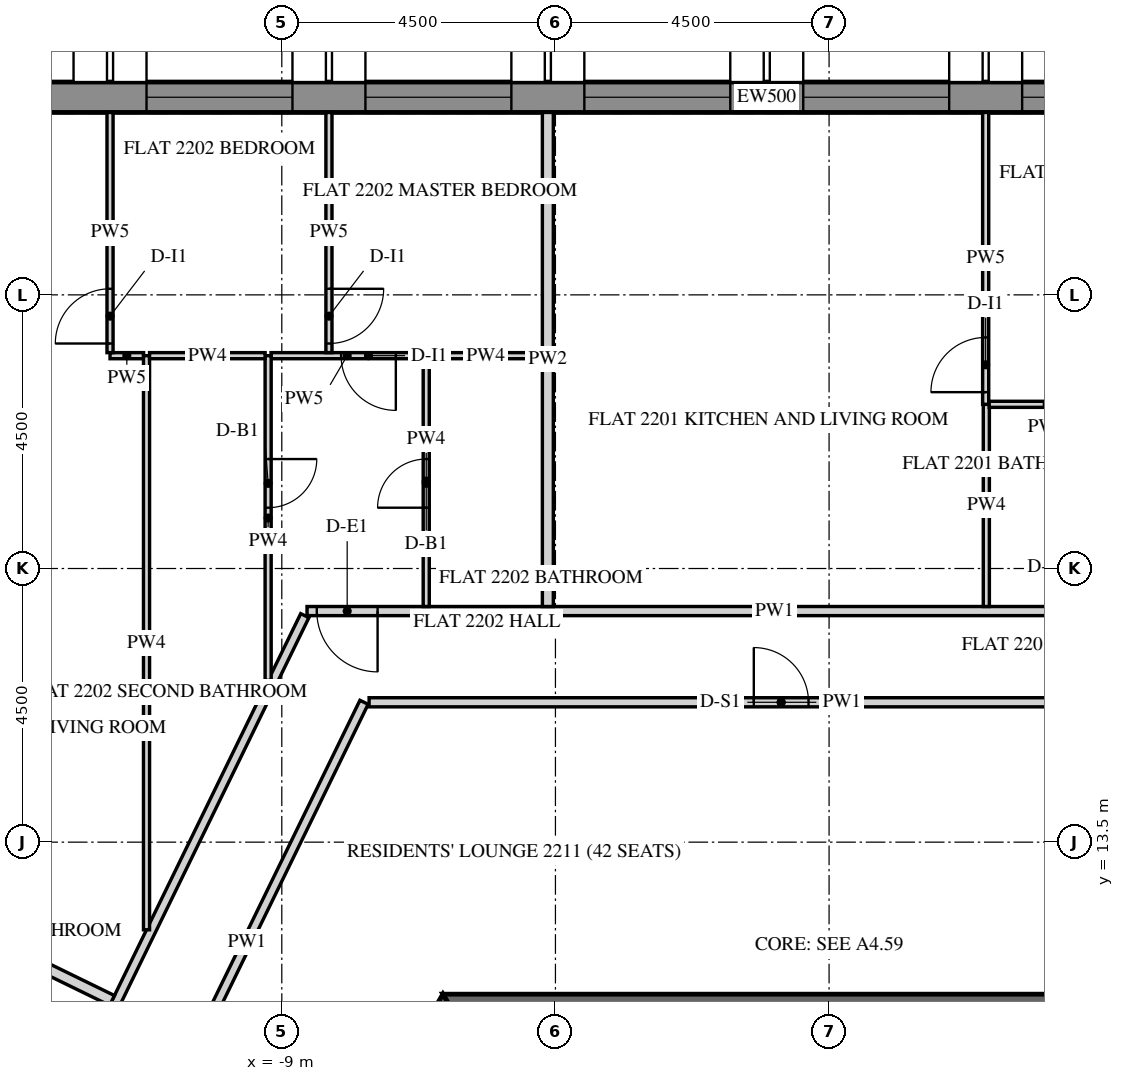
"""IFC4 building model, lengths in metres.
Left out: names, types, materials, properties, quantities, classifications, styles, units other than length and angle.
Written with IfcOpenShell. Run it as: python <this file> out.ifc"""

import sys

from ifc_helpers import new_model, si_unit, direction, frame, frame_2d, origin, place, context, subcontext, project, spatial, polyline, rectangle, outline, extrude, element, fill, save


model = new_model("IFC4")
c1 = context("Model", 3, precision=1e-05, world=origin(), true_north=direction((0.0, 1.0)))
c2 = subcontext(c1, "Body", "Model", "MODEL_VIEW")
j1 = project(units=[si_unit("LENGTHUNIT", "METRE"), si_unit("PLANEANGLEUNIT", "RADIAN")], contexts=[c1])
p1 = place(None, origin())
s1 = spatial("IfcSite", under=j1, at=p1, CompositionType="ELEMENT")
p2 = place(p1, origin())
s2 = spatial("IfcBuilding", under=s1, at=p2, CompositionType="ELEMENT")
p3 = place(p2, frame((0.0, 0.0, 279.6)))
s3 = spatial("IfcBuildingStorey", under=s2, at=p3, CompositionType="ELEMENT", Elevation=279.6)
p4 = place(p3, frame((11.698, 25.75, -0.15), z_axis=(0.0, 0.0, 1.0), x_axis=(-1.0, 0.0, 0.0)))
e1 = element("IfcWall", 1, at=p4, inside=s3, PredefinedType="SOLIDWALL", context=c2, shape_type="SweptSolid", body=[
    extrude(outline(polyline([(-0.021, -0.25), (25.468, -0.25), (25.421, 0.25), (0.021, 0.25), (-0.021, -0.25)])), origin(), (0.0, 0.0, 1.0), 3.9),
])
p5 = place(p4, frame((2.522, 0.0, 0.75)))
e2 = element("IfcOpeningElement", 2, at=p5, cuts=e1, PredefinedType="OPENING", context=c2, shape_type="SweptSolid", body=[
    extrude(rectangle(XDim=2.4, YDim=2.7, at=frame_2d((1.2, 1.35))), frame((0.0, 0.26, 0.0), z_axis=(0.0, -1.0, 0.0), x_axis=(1.0, 0.0, 0.0)), (0.0, 0.0, 1.0), 0.52),
])
p6 = place(p4, frame((6.122, 0.0, 0.75)))
e3 = element("IfcOpeningElement", 3, at=p6, cuts=e1, PredefinedType="OPENING", context=c2, shape_type="SweptSolid", body=[
    extrude(rectangle(XDim=2.4, YDim=2.7, at=frame_2d((1.2, 1.35))), frame((0.0, 0.26, 0.0), z_axis=(0.0, -1.0, 0.0), x_axis=(1.0, 0.0, 0.0)), (0.0, 0.0, 1.0), 0.52),
])
p7 = place(p4, frame((9.722, 0.0, 0.75)))
e4 = element("IfcOpeningElement", 4, at=p7, cuts=e1, PredefinedType="OPENING", context=c2, shape_type="SweptSolid", body=[
    extrude(rectangle(XDim=2.4, YDim=2.7, at=frame_2d((1.2, 1.35))), frame((0.0, 0.26, 0.0), z_axis=(0.0, -1.0, 0.0), x_axis=(1.0, 0.0, 0.0)), (0.0, 0.0, 1.0), 0.52),
])
p8 = place(p4, frame((13.323, 0.0, 0.75)))
e5 = element("IfcOpeningElement", 5, at=p8, cuts=e1, PredefinedType="OPENING", context=c2, shape_type="SweptSolid", body=[
    extrude(rectangle(XDim=2.4, YDim=2.7, at=frame_2d((1.2, 1.35))), frame((0.0, 0.26, 0.0), z_axis=(0.0, -1.0, 0.0), x_axis=(1.0, 0.0, 0.0)), (0.0, 0.0, 1.0), 0.52),
])
p9 = place(p4, frame((16.922, 0.0, 0.75)))
e6 = element("IfcOpeningElement", 6, at=p9, cuts=e1, PredefinedType="OPENING", context=c2, shape_type="SweptSolid", body=[
    extrude(rectangle(XDim=2.4, YDim=2.7, at=frame_2d((1.2, 1.35))), frame((0.0, 0.26, 0.0), z_axis=(0.0, -1.0, 0.0), x_axis=(1.0, 0.0, 0.0)), (0.0, 0.0, 1.0), 0.52),
])
p10 = place(p4, frame((20.522, 0.0, 0.75)))
e7 = element("IfcOpeningElement", 7, at=p10, cuts=e1, PredefinedType="OPENING", context=c2, shape_type="SweptSolid", body=[
    extrude(rectangle(XDim=2.4, YDim=2.7, at=frame_2d((1.2, 1.35))), frame((0.0, 0.26, 0.0), z_axis=(0.0, -1.0, 0.0), x_axis=(1.0, 0.0, 0.0)), (0.0, 0.0, 1.0), 0.52),
])
p11 = place(p3, frame((-6.235, 10.8, -0.15), z_axis=(0.0, 0.0, 1.0), x_axis=(-0.499996419489, -0.866027470984, 0.0)))
e8 = element("IfcWall", 8, at=p11, inside=s3, PredefinedType="SHEAR", context=c2, shape_type="SweptSolid", body=[
    extrude(outline(polyline([(-0.115, -0.2), (12.586, -0.2), (12.355, 0.2), (0.115, 0.2), (-0.115, -0.2)])), origin(), (0.0, 0.0, 1.0), 3.9),
])
p12 = place(p11, frame((5.364, 0.0, 0.15)))
e9 = element("IfcOpeningElement", 9, at=p12, cuts=e8, PredefinedType="OPENING", context=c2, shape_type="SweptSolid", body=[
    extrude(rectangle(XDim=1.8, YDim=2.4, at=frame_2d((0.9, 1.2))), frame((0.0, 0.21, 0.0), z_axis=(0.0, -1.0, 0.0), x_axis=(1.0, 0.0, 0.0)), (0.0, 0.0, 1.0), 0.42),
])
p13 = place(p3, frame((6.235, 10.8, -0.15), z_axis=(0.0, 0.0, 1.0), x_axis=(-1.0, 0.0, 0.0)))
e10 = element("IfcWall", 10, at=p13, inside=s3, PredefinedType="SHEAR", context=c2, shape_type="SweptSolid", body=[
    extrude(outline(polyline([(-0.115, -0.2), (12.586, -0.2), (12.355, 0.2), (0.115, 0.2), (-0.115, -0.2)])), origin(), (0.0, 0.0, 1.0), 3.9),
])
p14 = place(p3, frame((6.786, 17.3, 0.0), z_axis=(0.0, 0.0, 1.0), x_axis=(-1.0, 0.0, 0.0)))
e11 = element("IfcWall", 11, at=p14, inside=s3, PredefinedType="PARTITIONING", context=c2, shape_type="SweptSolid", body=[
    extrude(rectangle(XDim=15.371, YDim=0.15, at=frame_2d((7.686, 0.0))), origin(), (0.0, 0.0, 1.0), 2.988),
])
p15 = place(p14, frame((0.6, 0.0, 0.0)))
e12 = element("IfcOpeningElement", 12, at=p15, cuts=e11, PredefinedType="OPENING", context=c2, shape_type="SweptSolid", body=[
    extrude(rectangle(XDim=1.0, YDim=2.1, at=frame_2d((0.5, 1.05))), frame((0.0, 0.085, 0.0), z_axis=(0.0, -1.0, 0.0), x_axis=(1.0, 0.0, 0.0)), (0.0, 0.0, 1.0), 0.17),
])
p16 = place(p14, frame((14.211, 0.0, 0.0)))
e13 = element("IfcOpeningElement", 13, at=p16, cuts=e11, PredefinedType="OPENING", context=c2, shape_type="SweptSolid", body=[
    extrude(rectangle(XDim=1.0, YDim=2.1, at=frame_2d((0.5, 1.05))), frame((0.0, 0.085, 0.0), z_axis=(0.0, -1.0, 0.0), x_axis=(1.0, 0.0, 0.0)), (0.0, 0.0, 1.0), 0.17),
])
p17 = place(p3, frame((-8.622, 17.225, 0.0), z_axis=(0.0, 0.0, 1.0), x_axis=(-0.438366544921, -0.898796290765, 0.0)))
e14 = element("IfcWall", 14, at=p17, inside=s3, PredefinedType="PARTITIONING", context=c2, shape_type="SweptSolid", body=[
    extrude(rectangle(XDim=17.273, YDim=0.15, at=frame_2d((8.637, 0.0))), origin(), (0.0, 0.0, 1.0), 2.988),
])
p18 = place(p17, frame((10.078, 0.0, 0.0)))
e15 = element("IfcOpeningElement", 15, at=p18, cuts=e14, PredefinedType="OPENING", context=c2, shape_type="SweptSolid", body=[
    extrude(rectangle(XDim=1.0, YDim=2.1, at=frame_2d((0.5, 1.05))), frame((0.0, 0.085, 0.0), z_axis=(0.0, -1.0, 0.0), x_axis=(1.0, 0.0, 0.0)), (0.0, 0.0, 1.0), 0.17),
])
p19 = place(p3, frame((-11.499, 7.905, 0.0), z_axis=(0.0, 0.0, 1.0), x_axis=(0.438365041944, 0.898797023805, 0.0)))
e16 = element("IfcWall", 16, at=p19, inside=s3, PredefinedType="PARTITIONING", context=c2, shape_type="SweptSolid", body=[
    extrude(rectangle(XDim=8.784, YDim=0.15, at=frame_2d((4.392, 0.0))), origin(), (0.0, 0.0, 1.0), 2.988),
])
p20 = place(p3, frame((-7.564, 15.8, 0.0), z_axis=(0.0, 0.0, 1.0), x_axis=(1.0, 0.0, 0.0)))
e17 = element("IfcWall", 17, at=p20, inside=s3, PredefinedType="PARTITIONING", context=c2, shape_type="SweptSolid", body=[
    extrude(rectangle(XDim=13.553, YDim=0.15, at=frame_2d((6.776, 0.0))), origin(), (0.0, 0.0, 1.0), 2.988),
])
p21 = place(p20, frame((6.326, 0.0, 0.0)))
e18 = element("IfcOpeningElement", 18, at=p21, cuts=e17, PredefinedType="OPENING", context=c2, shape_type="SweptSolid", body=[
    extrude(rectangle(XDim=0.9, YDim=2.1, at=frame_2d((0.45, 1.05))), frame((0.0, 0.085, 0.0), z_axis=(0.0, -1.0, 0.0), x_axis=(1.0, 0.0, 0.0)), (0.0, 0.0, 1.0), 0.17),
])
p22 = place(p3, frame((2.586, 17.375, 0.0), z_axis=(0.0, 0.0, 1.0), x_axis=(0.0, 1.0, 0.0)))
e19 = element("IfcWall", 19, at=p22, inside=s3, PredefinedType="PARTITIONING", context=c2, shape_type="SweptSolid", body=[
    extrude(rectangle(XDim=3.325, YDim=0.1, at=frame_2d((1.663, 0.0))), origin(), (0.0, 0.0, 1.0), 2.988),
])
p23 = place(p3, frame((2.575, 20.7, 0.0), z_axis=(0.0, 0.0, 1.0), x_axis=(0.0, 1.0, 0.0)))
e20 = element("IfcWall", 20, at=p23, inside=s3, PredefinedType="PARTITIONING", context=c2, shape_type="SweptSolid", body=[
    extrude(rectangle(XDim=4.8, YDim=0.1, at=frame_2d((2.4, 0.0))), origin(), (0.0, 0.0, 1.0), 2.988),
])
p24 = place(p23, frame((0.2, 0.0, 0.0)))
e21 = element("IfcOpeningElement", 21, at=p24, cuts=e20, PredefinedType="OPENING", context=c2, shape_type="SweptSolid", body=[
    extrude(rectangle(XDim=0.9, YDim=2.1, at=frame_2d((0.45, 1.05))), frame((0.0, 0.06, 0.0), z_axis=(0.0, -1.0, 0.0), x_axis=(1.0, 0.0, 0.0)), (0.0, 0.0, 1.0), 0.12),
])
p25 = place(p3, frame((-4.625, 25.5, 0.0), z_axis=(0.0, 0.0, 1.0), x_axis=(0.0, -1.0, 0.0)))
e22 = element("IfcWall", 22, at=p25, inside=s3, PredefinedType="PARTITIONING", context=c2, shape_type="SweptSolid", body=[
    extrude(rectangle(XDim=8.125, YDim=0.18, at=frame_2d((4.062, 0.0))), origin(), (0.0, 0.0, 1.0), 2.988),
])
p26 = place(p3, frame((4.538, 20.7, 0.0), z_axis=(0.0, 0.0, 1.0), x_axis=(-1.0, 0.0, 0.0)))
e23 = element("IfcWall", 23, at=p26, inside=s3, PredefinedType="PARTITIONING", context=c2, shape_type="SweptSolid", body=[
    extrude(rectangle(XDim=1.904, YDim=0.1, at=frame_2d((0.952, 0.0))), origin(), (0.0, 0.0, 1.0), 2.988),
])
p27 = place(p3, frame((-11.273, 21.5, 0.0), z_axis=(0.0, 0.0, 1.0), x_axis=(-1.0, 0.0, 0.0)))
e24 = element("IfcWall", 24, at=p27, inside=s3, PredefinedType="PARTITIONING", context=c2, shape_type="SweptSolid", body=[
    extrude(rectangle(XDim=0.552, YDim=0.1, at=frame_2d((0.276, 0.0))), origin(), (0.0, 0.0, 1.0), 2.988),
])
p28 = place(p3, frame((-11.825, 21.55, 0.0), z_axis=(0.0, 0.0, 1.0), x_axis=(0.0, 1.0, 0.0)))
e25 = element("IfcWall", 25, at=p28, inside=s3, PredefinedType="PARTITIONING", context=c2, shape_type="SweptSolid", body=[
    extrude(rectangle(XDim=3.95, YDim=0.1, at=frame_2d((1.975, 0.0))), origin(), (0.0, 0.0, 1.0), 2.988),
])
p29 = place(p28, frame((0.15, 0.0, 0.0)))
e26 = element("IfcOpeningElement", 26, at=p29, cuts=e25, PredefinedType="OPENING", context=c2, shape_type="SweptSolid", body=[
    extrude(rectangle(XDim=0.9, YDim=2.1, at=frame_2d((0.45, 1.05))), frame((0.0, 0.06, 0.0), z_axis=(0.0, -1.0, 0.0), x_axis=(1.0, 0.0, 0.0)), (0.0, 0.0, 1.0), 0.12),
])
p30 = place(p3, frame((-11.225, 12.059, 0.0), z_axis=(0.0, 0.0, 1.0), x_axis=(0.0, 1.0, 0.0)))
e27 = element("IfcWall", 27, at=p30, inside=s3, PredefinedType="PARTITIONING", context=c2, shape_type="SweptSolid", body=[
    extrude(rectangle(XDim=9.441, YDim=0.1, at=frame_2d((4.721, 0.0))), origin(), (0.0, 0.0, 1.0), 2.988),
])
p31 = place(p3, frame((-19.094, 14.458, 0.0), z_axis=(0.0, 0.0, 1.0), x_axis=(0.898794723364, -0.438369758597, 0.0)))
e28 = element("IfcWall", 28, at=p31, inside=s3, PredefinedType="PARTITIONING", context=c2, shape_type="SweptSolid", body=[
    extrude(rectangle(XDim=8.125, YDim=0.18, at=frame_2d((4.062, 0.0))), origin(), (0.0, 0.0, 1.0), 2.988),
])
p32 = place(p3, frame((-6.625, 17.375, 0.0), z_axis=(0.0, 0.0, 1.0), x_axis=(0.0, 1.0, 0.0)))
e29 = element("IfcWall", 29, at=p32, inside=s3, PredefinedType="PARTITIONING", context=c2, shape_type="SweptSolid", body=[
    extrude(rectangle(XDim=4.125, YDim=0.1, at=frame_2d((2.062, 0.0))), origin(), (0.0, 0.0, 1.0), 2.988),
])
p33 = place(p32, frame((1.625, 0.0, 0.0)))
e30 = element("IfcOpeningElement", 30, at=p33, cuts=e29, PredefinedType="OPENING", context=c2, shape_type="SweptSolid", body=[
    extrude(rectangle(XDim=0.8, YDim=2.1, at=frame_2d((0.4, 1.05))), frame((0.0, 0.06, 0.0), z_axis=(0.0, -1.0, 0.0), x_axis=(1.0, 0.0, 0.0)), (0.0, 0.0, 1.0), 0.12),
])
p34 = place(p3, frame((-6.673, 21.5, 0.0), z_axis=(0.0, 0.0, 1.0), x_axis=(-1.0, 0.0, 0.0)))
e31 = element("IfcWall", 31, at=p34, inside=s3, PredefinedType="PARTITIONING", context=c2, shape_type="SweptSolid", body=[
    extrude(rectangle(XDim=2.504, YDim=0.1, at=frame_2d((1.252, 0.0))), origin(), (0.0, 0.0, 1.0), 2.988),
])
p35 = place(p34, frame((0.452, 0.0, 0.0)))
e32 = element("IfcOpeningElement", 32, at=p35, cuts=e31, PredefinedType="OPENING", context=c2, shape_type="SweptSolid", body=[
    extrude(rectangle(XDim=0.9, YDim=2.1, at=frame_2d((0.45, 1.05))), frame((0.0, 0.06, 0.0), z_axis=(0.0, -1.0, 0.0), x_axis=(1.0, 0.0, 0.0)), (0.0, 0.0, 1.0), 0.12),
])
p36 = place(p3, frame((-9.225, 21.5, 0.0), z_axis=(0.0, 0.0, 1.0), x_axis=(0.0, -1.0, 0.0)))
e33 = element("IfcWall", 33, at=p36, inside=s3, PredefinedType="PARTITIONING", context=c2, shape_type="SweptSolid", body=[
    extrude(rectangle(XDim=5.341, YDim=0.1, at=frame_2d((2.67, 0.0))), origin(), (0.0, 0.0, 1.0), 2.988),
])
p37 = place(p36, frame((1.7, 0.0, 0.0)))
e34 = element("IfcOpeningElement", 34, at=p37, cuts=e33, PredefinedType="OPENING", context=c2, shape_type="SweptSolid", body=[
    extrude(rectangle(XDim=0.8, YDim=2.1, at=frame_2d((0.4, 1.05))), frame((0.0, 0.06, 0.0), z_axis=(0.0, -1.0, 0.0), x_axis=(1.0, 0.0, 0.0)), (0.0, 0.0, 1.0), 0.12),
])
p38 = place(p3, frame((-4.715, 21.5, 0.0), z_axis=(0.0, 0.0, 1.0), x_axis=(-1.0, 0.0, 0.0)))
e35 = element("IfcWall", 35, at=p38, inside=s3, PredefinedType="PARTITIONING", context=c2, shape_type="SweptSolid", body=[
    extrude(rectangle(XDim=1.862, YDim=0.1, at=frame_2d((0.931, 0.0))), origin(), (0.0, 0.0, 1.0), 2.988),
])
p39 = place(p3, frame((-8.225, 25.5, 0.0), z_axis=(0.0, 0.0, 1.0), x_axis=(0.0, -1.0, 0.0)))
e36 = element("IfcWall", 36, at=p39, inside=s3, PredefinedType="PARTITIONING", context=c2, shape_type="SweptSolid", body=[
    extrude(rectangle(XDim=3.95, YDim=0.1, at=frame_2d((1.975, 0.0))), origin(), (0.0, 0.0, 1.0), 2.988),
])
p40 = place(p39, frame((2.9, 0.0, 0.0)))
e37 = element("IfcOpeningElement", 37, at=p40, cuts=e36, PredefinedType="OPENING", context=c2, shape_type="SweptSolid", body=[
    extrude(rectangle(XDim=0.9, YDim=2.1, at=frame_2d((0.45, 1.05))), frame((0.0, 0.06, 0.0), z_axis=(0.0, -1.0, 0.0), x_axis=(1.0, 0.0, 0.0)), (0.0, 0.0, 1.0), 0.12),
])
p41 = place(p3, frame((-11.175, 21.5, 0.0), z_axis=(0.0, 0.0, 1.0), x_axis=(1.0, 0.0, 0.0)))
e38 = element("IfcWall", 38, at=p41, inside=s3, PredefinedType="PARTITIONING", context=c2, shape_type="SweptSolid", body=[
    extrude(rectangle(XDim=1.9, YDim=0.1, at=frame_2d((0.95, 0.0))), origin(), (0.0, 0.0, 1.0), 2.988),
])
p42 = place(p3, frame((-12.668, 9.099, 0.0), z_axis=(0.0, 0.0, 1.0), x_axis=(-0.898810534939, 0.438337338454, 0.0)))
e39 = element("IfcWall", 39, at=p42, inside=s3, PredefinedType="PARTITIONING", context=c2, shape_type="SweptSolid", body=[
    extrude(rectangle(XDim=4.125, YDim=0.1, at=frame_2d((2.062, 0.0))), origin(), (0.0, 0.0, 1.0), 2.988),
])
p43 = place(p42, frame((1.625, 0.0, 0.0)))
e40 = element("IfcOpeningElement", 40, at=p43, cuts=e39, PredefinedType="OPENING", context=c2, shape_type="SweptSolid", body=[
    extrude(rectangle(XDim=0.8, YDim=2.1, at=frame_2d((0.4, 1.05))), frame((0.0, 0.06, 0.0), z_axis=(0.0, -1.0, 0.0), x_axis=(1.0, 0.0, 0.0)), (0.0, 0.0, 1.0), 0.12),
])
p44 = place(p6, frame((0.0, 0.18, 0.0)))
e41 = element("IfcWindow", 41, at=p44, inside=s3, PartitioningType="DOUBLE_PANEL_VERTICAL", PredefinedType="WINDOW", context=c2, shape_type="SweptSolid", body=[
    extrude(rectangle(XDim=2.4, YDim=2.7, at=frame_2d((1.2, 1.35))), frame((0.0, 0.03, 0.0), z_axis=(0.0, -1.0, 0.0), x_axis=(1.0, 0.0, 0.0)), (0.0, 0.0, 1.0), 0.06),
])
fill(e3, e41)
p45 = place(p7, frame((0.0, 0.18, 0.0)))
e42 = element("IfcWindow", 42, at=p45, inside=s3, PartitioningType="DOUBLE_PANEL_VERTICAL", PredefinedType="WINDOW", context=c2, shape_type="SweptSolid", body=[
    extrude(rectangle(XDim=2.4, YDim=2.7, at=frame_2d((1.2, 1.35))), frame((0.0, 0.03, 0.0), z_axis=(0.0, -1.0, 0.0), x_axis=(1.0, 0.0, 0.0)), (0.0, 0.0, 1.0), 0.06),
])
fill(e4, e42)
p46 = place(p8, frame((0.0, 0.18, 0.0)))
e43 = element("IfcWindow", 43, at=p46, inside=s3, PartitioningType="DOUBLE_PANEL_VERTICAL", PredefinedType="WINDOW", context=c2, shape_type="SweptSolid", body=[
    extrude(rectangle(XDim=2.4, YDim=2.7, at=frame_2d((1.2, 1.35))), frame((0.0, 0.03, 0.0), z_axis=(0.0, -1.0, 0.0), x_axis=(1.0, 0.0, 0.0)), (0.0, 0.0, 1.0), 0.06),
])
fill(e5, e43)
p47 = place(p9, frame((0.0, 0.18, 0.0)))
e44 = element("IfcWindow", 44, at=p47, inside=s3, PartitioningType="DOUBLE_PANEL_VERTICAL", PredefinedType="WINDOW", context=c2, shape_type="SweptSolid", body=[
    extrude(rectangle(XDim=2.4, YDim=2.7, at=frame_2d((1.2, 1.35))), frame((0.0, 0.03, 0.0), z_axis=(0.0, -1.0, 0.0), x_axis=(1.0, 0.0, 0.0)), (0.0, 0.0, 1.0), 0.06),
])
fill(e6, e44)
p48 = place(p10, frame((0.0, 0.18, 0.0)))
e45 = element("IfcWindow", 45, at=p48, inside=s3, PartitioningType="DOUBLE_PANEL_VERTICAL", PredefinedType="WINDOW", context=c2, shape_type="SweptSolid", body=[
    extrude(rectangle(XDim=2.4, YDim=2.7, at=frame_2d((1.2, 1.35))), frame((0.0, 0.03, 0.0), z_axis=(0.0, -1.0, 0.0), x_axis=(1.0, 0.0, 0.0)), (0.0, 0.0, 1.0), 0.06),
])
fill(e7, e45)
p49 = place(p24, origin())
e46 = element("IfcDoor", 46, at=p49, inside=s3, OperationType="SINGLE_SWING_RIGHT", PredefinedType="DOOR", context=c2, shape_type="SweptSolid", body=[
    extrude(rectangle(XDim=0.9, YDim=2.1, at=frame_2d((0.45, 1.05))), frame((0.0, 0.025, 0.0), z_axis=(0.0, -1.0, 0.0), x_axis=(1.0, 0.0, 0.0)), (0.0, 0.0, 1.0), 0.05),
])
fill(e21, e46)
p50 = place(p16, origin())
e47 = element("IfcDoor", 47, at=p50, inside=s3, OperationType="SINGLE_SWING_LEFT", PredefinedType="DOOR", context=c2, shape_type="SweptSolid", body=[
    extrude(rectangle(XDim=1.0, YDim=2.1, at=frame_2d((0.5, 1.05))), frame((0.0, 0.025, 0.0), z_axis=(0.0, -1.0, 0.0), x_axis=(1.0, 0.0, 0.0)), (0.0, 0.0, 1.0), 0.05),
])
fill(e13, e47)
p51 = place(p33, origin())
e48 = element("IfcDoor", 48, at=p51, inside=s3, OperationType="SINGLE_SWING_RIGHT", PredefinedType="DOOR", context=c2, shape_type="SweptSolid", body=[
    extrude(rectangle(XDim=0.8, YDim=2.1, at=frame_2d((0.4, 1.05))), frame((0.0, 0.025, 0.0), z_axis=(0.0, -1.0, 0.0), x_axis=(1.0, 0.0, 0.0)), (0.0, 0.0, 1.0), 0.05),
])
fill(e30, e48)
p52 = place(p35, origin())
e49 = element("IfcDoor", 49, at=p52, inside=s3, OperationType="SINGLE_SWING_LEFT", PredefinedType="DOOR", context=c2, shape_type="SweptSolid", body=[
    extrude(rectangle(XDim=0.9, YDim=2.1, at=frame_2d((0.45, 1.05))), frame((0.0, 0.025, 0.0), z_axis=(0.0, -1.0, 0.0), x_axis=(1.0, 0.0, 0.0)), (0.0, 0.0, 1.0), 0.05),
])
fill(e32, e49)
p53 = place(p40, origin())
e50 = element("IfcDoor", 50, at=p53, inside=s3, OperationType="SINGLE_SWING_RIGHT", PredefinedType="DOOR", context=c2, shape_type="SweptSolid", body=[
    extrude(rectangle(XDim=0.9, YDim=2.1, at=frame_2d((0.45, 1.05))), frame((0.0, 0.025, 0.0), z_axis=(0.0, -1.0, 0.0), x_axis=(1.0, 0.0, 0.0)), (0.0, 0.0, 1.0), 0.05),
])
fill(e37, e50)
p54 = place(p29, origin())
e51 = element("IfcDoor", 51, at=p54, inside=s3, OperationType="SINGLE_SWING_RIGHT", PredefinedType="DOOR", context=c2, shape_type="SweptSolid", body=[
    extrude(rectangle(XDim=0.9, YDim=2.1, at=frame_2d((0.45, 1.05))), frame((0.0, 0.025, 0.0), z_axis=(0.0, -1.0, 0.0), x_axis=(1.0, 0.0, 0.0)), (0.0, 0.0, 1.0), 0.05),
])
fill(e26, e51)
p55 = place(p37, origin())
e52 = element("IfcDoor", 52, at=p55, inside=s3, OperationType="SINGLE_SWING_RIGHT", PredefinedType="DOOR", context=c2, shape_type="SweptSolid", body=[
    extrude(rectangle(XDim=0.8, YDim=2.1, at=frame_2d((0.4, 1.05))), frame((0.0, 0.025, 0.0), z_axis=(0.0, -1.0, 0.0), x_axis=(1.0, 0.0, 0.0)), (0.0, 0.0, 1.0), 0.05),
])
fill(e34, e52)
p56 = place(p21, origin())
e53 = element("IfcDoor", 53, at=p56, inside=s3, OperationType="SINGLE_SWING_LEFT", PredefinedType="DOOR", context=c2, shape_type="SweptSolid", body=[
    extrude(rectangle(XDim=0.9, YDim=2.1, at=frame_2d((0.45, 1.05))), frame((0.0, 0.025, 0.0), z_axis=(0.0, -1.0, 0.0), x_axis=(1.0, 0.0, 0.0)), (0.0, 0.0, 1.0), 0.05),
])
fill(e18, e53)
save(model, sys.argv[1])
